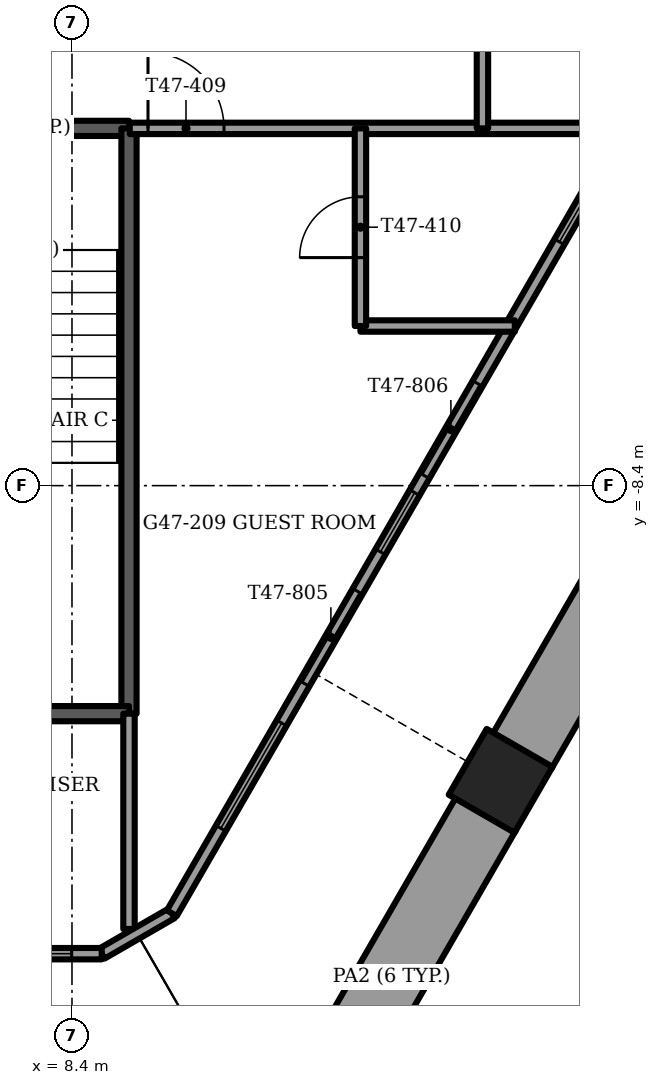
"""IFC4 building model, lengths in metres.
Left out: names, types, materials, properties, quantities, classifications, styles, units other than length and angle.
Written with IfcOpenShell. Run it as: python <this file> out.ifc"""

import sys

from ifc_helpers import new_model, si_unit, direction, frame, frame_2d, origin, origin_2d, place, context, subcontext, project, spatial, rectangle, extrude, element, fill, save


model = new_model("IFC4")
c1 = context("Model", 3, precision=1e-05, world=origin(), true_north=direction((0.0, 1.0)))
c2 = subcontext(c1, "Body", "Model", "MODEL_VIEW")
j1 = project(units=[si_unit("LENGTHUNIT", "METRE"), si_unit("PLANEANGLEUNIT", "RADIAN")], contexts=[c1])
p1 = place(None, origin())
s1 = spatial("IfcSite", under=j1, at=p1, CompositionType="ELEMENT")
p2 = place(p1, origin())
s2 = spatial("IfcBuilding", under=s1, at=p2, CompositionType="ELEMENT")
p3 = place(p2, frame((0.0, 0.0, 190.75)))
s3 = spatial("IfcBuildingStorey", under=s2, at=p3, CompositionType="ELEMENT", Elevation=190.75)
p4 = place(p3, frame((14.039, -12.283, -1.2), z_axis=(0.0, 0.0, 1.0), x_axis=(-0.5, -0.866025403784, 0.0)))
e1 = element("IfcColumn", 1, at=p4, inside=s3, PredefinedType="COLUMN", context=c2, shape_type="SweptSolid", body=[
    extrude(rectangle(XDim=1.0, YDim=1.0, at=origin_2d()), origin(), (0.0, 0.0, 1.0), 3.75),
])
p5 = place(p3, frame((11.366, -17.013, 0.0), z_axis=(0.0, 0.0, 1.0), x_axis=(0.499996428664, 0.866027465686, 0.0)))
e2 = element("IfcWall", 2, at=p5, inside=s3, PredefinedType="PARAPET", context=c2, shape_type="SweptSolid", body=[
    extrude(rectangle(XDim=4.962, YDim=0.9, at=frame_2d((2.481, 0.0))), origin(), (0.0, 0.0, 1.0), 1.1),
])
p6 = place(p3, frame((14.317, -11.901, 0.0), z_axis=(0.0, 0.0, 1.0), x_axis=(0.500013351051, 0.866017695414, 0.0)))
e3 = element("IfcWall", 3, at=p6, inside=s3, PredefinedType="PARAPET", context=c2, shape_type="SweptSolid", body=[
    extrude(rectangle(XDim=6.296, YDim=0.9, at=frame_2d((3.148, 0.0))), origin(), (0.0, 0.0, 1.0), 1.1),
])
p7 = place(p3, frame((-8.792, -14.558, 0.0), z_axis=(0.0, 0.0, 1.0), x_axis=(1.0, 0.0, 0.0)))
e4 = element("IfcWall", 4, at=p7, inside=s3, PredefinedType="SOLIDWALL", context=c2, shape_type="SweptSolid", body=[
    extrude(rectangle(XDim=17.583, YDim=0.15, at=frame_2d((8.792, 0.0))), origin(), (0.0, 0.0, 1.0), 3.45),
])
p8 = place(p7, frame((3.342, 0.0, 0.15)))
e5 = element("IfcOpeningElement", 5, at=p8, cuts=e4, PredefinedType="OPENING", context=c2, shape_type="SweptSolid", body=[
    extrude(rectangle(XDim=1.6, YDim=2.85, at=frame_2d((0.8, 1.425))), frame((0.0, 0.075, 0.0), z_axis=(0.0, -1.0, 0.0), x_axis=(1.0, 0.0, 0.0)), (0.0, 0.0, 1.0), 0.15),
])
p9 = place(p7, frame((4.991, 0.0, 0.0)))
e6 = element("IfcOpeningElement", 6, at=p9, cuts=e4, PredefinedType="OPENING", context=c2, shape_type="SweptSolid", body=[
    extrude(rectangle(XDim=1.4, YDim=2.4, at=frame_2d((0.7, 1.2))), frame((0.0, 0.075, 0.0), z_axis=(0.0, -1.0, 0.0), x_axis=(1.0, 0.0, 0.0)), (0.0, 0.0, 1.0), 0.15),
])
p10 = place(p7, frame((8.241, 0.0, 0.15)))
e7 = element("IfcOpeningElement", 7, at=p10, cuts=e4, PredefinedType="OPENING", context=c2, shape_type="SweptSolid", body=[
    extrude(rectangle(XDim=0.9, YDim=2.85, at=frame_2d((0.45, 1.425))), frame((0.0, 0.075, 0.0), z_axis=(0.0, -1.0, 0.0), x_axis=(1.0, 0.0, 0.0)), (0.0, 0.0, 1.0), 0.15),
])
p11 = place(p7, frame((11.191, 0.0, 0.15)))
e8 = element("IfcOpeningElement", 8, at=p11, cuts=e4, PredefinedType="OPENING", context=c2, shape_type="SweptSolid", body=[
    extrude(rectangle(XDim=0.9, YDim=2.85, at=frame_2d((0.45, 1.425))), frame((0.0, 0.075, 0.0), z_axis=(0.0, -1.0, 0.0), x_axis=(1.0, 0.0, 0.0)), (0.0, 0.0, 1.0), 0.15),
])
p12 = place(p7, frame((12.292, 0.0, 0.0)))
e9 = element("IfcOpeningElement", 9, at=p12, cuts=e4, PredefinedType="OPENING", context=c2, shape_type="SweptSolid", body=[
    extrude(rectangle(XDim=1.4, YDim=2.4, at=frame_2d((0.7, 1.2))), frame((0.0, 0.075, 0.0), z_axis=(0.0, -1.0, 0.0), x_axis=(1.0, 0.0, 0.0)), (0.0, 0.0, 1.0), 0.15),
])
p13 = place(p7, frame((0.396, 0.0, 0.15)))
e10 = element("IfcOpeningElement", 10, at=p13, cuts=e4, PredefinedType="OPENING", context=c2, shape_type="SweptSolid", body=[
    extrude(rectangle(XDim=1.6, YDim=2.73, at=frame_2d((0.8, 1.365))), frame((0.0, 0.075, 0.0), z_axis=(0.0, -1.0, 0.0), x_axis=(1.0, 0.0, 0.0)), (0.0, 0.0, 1.0), 0.15),
])
p14 = place(p7, frame((15.587, 0.0, 0.15)))
e11 = element("IfcOpeningElement", 11, at=p14, cuts=e4, PredefinedType="OPENING", context=c2, shape_type="SweptSolid", body=[
    extrude(rectangle(XDim=1.6, YDim=2.73, at=frame_2d((0.8, 1.365))), frame((0.0, 0.075, 0.0), z_axis=(0.0, -1.0, 0.0), x_axis=(1.0, 0.0, 0.0)), (0.0, 0.0, 1.0), 0.15),
])
p15 = place(p3, frame((9.714, -14.025, 0.0), z_axis=(0.0, 0.0, 1.0), x_axis=(0.500006098247, 0.866021882931, 0.0)))
e12 = element("IfcWall", 12, at=p15, inside=s3, PredefinedType="SOLIDWALL", context=c2, shape_type="SweptSolid", body=[
    extrude(rectangle(XDim=14.578, YDim=0.15, at=frame_2d((7.289, 0.0))), origin(), (0.0, 0.0, 1.0), 3.45),
])
p16 = place(p15, frame((1.289, 0.0, 0.15)))
e13 = element("IfcOpeningElement", 13, at=p16, cuts=e12, PredefinedType="OPENING", context=c2, shape_type="SweptSolid", body=[
    extrude(rectangle(XDim=1.6, YDim=2.85, at=frame_2d((0.8, 1.425))), frame((0.0, 0.075, 0.0), z_axis=(0.0, -1.0, 0.0), x_axis=(1.0, 0.0, 0.0)), (0.0, 0.0, 1.0), 0.15),
])
p17 = place(p15, frame((3.489, 0.0, 0.0)))
e14 = element("IfcOpeningElement", 14, at=p17, cuts=e12, PredefinedType="OPENING", context=c2, shape_type="SweptSolid", body=[
    extrude(rectangle(XDim=1.4, YDim=2.4, at=frame_2d((0.7, 1.2))), frame((0.0, 0.075, 0.0), z_axis=(0.0, -1.0, 0.0), x_axis=(1.0, 0.0, 0.0)), (0.0, 0.0, 1.0), 0.15),
])
p18 = place(p15, frame((5.489, 0.0, 0.15)))
e15 = element("IfcOpeningElement", 15, at=p18, cuts=e12, PredefinedType="OPENING", context=c2, shape_type="SweptSolid", body=[
    extrude(rectangle(XDim=0.9, YDim=2.85, at=frame_2d((0.45, 1.425))), frame((0.0, 0.075, 0.0), z_axis=(0.0, -1.0, 0.0), x_axis=(1.0, 0.0, 0.0)), (0.0, 0.0, 1.0), 0.15),
])
p19 = place(p15, frame((6.646, 0.0, 0.0)))
e16 = element("IfcOpeningElement", 16, at=p19, cuts=e12, PredefinedType="OPENING", context=c2, shape_type="SweptSolid", body=[
    extrude(rectangle(XDim=1.4, YDim=2.4, at=frame_2d((0.7, 1.2))), frame((0.0, 0.075, 0.0), z_axis=(0.0, -1.0, 0.0), x_axis=(1.0, 0.0, 0.0)), (0.0, 0.0, 1.0), 0.15),
])
p20 = place(p15, frame((12.298, 0.0, 0.15)))
e17 = element("IfcOpeningElement", 17, at=p20, cuts=e12, PredefinedType="OPENING", context=c2, shape_type="SweptSolid", body=[
    extrude(rectangle(XDim=0.9, YDim=2.85, at=frame_2d((0.45, 1.425))), frame((0.0, 0.075, 0.0), z_axis=(0.0, -1.0, 0.0), x_axis=(1.0, 0.0, 0.0)), (0.0, 0.0, 1.0), 0.15),
])
p21 = place(p15, frame((10.198, 0.0, 0.15)))
e18 = element("IfcOpeningElement", 18, at=p21, cuts=e12, PredefinedType="OPENING", context=c2, shape_type="SweptSolid", body=[
    extrude(rectangle(XDim=1.4, YDim=2.85, at=frame_2d((0.7, 1.425))), frame((0.0, 0.075, 0.0), z_axis=(0.0, -1.0, 0.0), x_axis=(1.0, 0.0, 0.0)), (0.0, 0.0, 1.0), 0.15),
])
p22 = place(p3, frame((8.792, -14.558, 0.0), z_axis=(0.0, 0.0, 1.0), x_axis=(0.866048165231, 0.499960573946, 0.0)))
e19 = element("IfcWall", 19, at=p22, inside=s3, PredefinedType="SOLIDWALL", context=c2, shape_type="SweptSolid", body=[
    extrude(rectangle(XDim=1.065, YDim=0.15, at=frame_2d((0.532, 0.0))), origin(), (0.0, 0.0, 1.0), 3.45),
])
p23 = place(p3, frame((5.8, -3.7, -0.3), z_axis=(0.0, 0.0, 1.0), x_axis=(1.0, 0.0, 0.0)))
e20 = element("IfcWall", 20, at=p23, inside=s3, PredefinedType="SOLIDWALL", context=c2, shape_type="SweptSolid", body=[
    extrude(rectangle(XDim=3.35, YDim=0.2, at=frame_2d((1.675, 0.0))), origin(), (0.0, 0.0, 1.0), 3.75),
])
p24 = place(p23, frame((1.125, 0.0, 0.0)))
e21 = element("IfcOpeningElement", 21, at=p24, cuts=e20, PredefinedType="OPENING", context=c2, shape_type="SweptSolid", body=[
    extrude(rectangle(XDim=1.1, YDim=2.1, at=frame_2d((0.55, 1.05))), frame((0.0, 0.1, 0.0), z_axis=(0.0, -1.0, 0.0), x_axis=(1.0, 0.0, 0.0)), (0.0, 0.0, 1.0), 0.2),
])
p25 = place(p3, frame((9.15, -3.7, -0.3), z_axis=(0.0, 0.0, 1.0), x_axis=(0.0, -1.0, 0.0)))
e22 = element("IfcWall", 22, at=p25, inside=s3, PredefinedType="SOLIDWALL", context=c2, shape_type="SweptSolid", body=[
    extrude(rectangle(XDim=7.7, YDim=0.2, at=frame_2d((3.85, 0.0))), origin(), (0.0, 0.0, 1.0), 3.75),
])
p26 = place(p3, frame((5.8, -11.4, -0.3), z_axis=(0.0, 0.0, 1.0), x_axis=(1.0, 0.0, 0.0)))
e23 = element("IfcWall", 23, at=p26, inside=s3, PredefinedType="SOLIDWALL", context=c2, shape_type="SweptSolid", body=[
    extrude(rectangle(XDim=3.35, YDim=0.2, at=frame_2d((1.675, 0.0))), origin(), (0.0, 0.0, 1.0), 3.75),
])
p27 = place(p3, frame((9.15, -11.4, 0.0), z_axis=(0.0, 0.0, 1.0), x_axis=(0.0, -1.0, 0.0)))
e24 = element("IfcWall", 24, at=p27, inside=s3, PredefinedType="PARTITIONING", context=c2, shape_type="SweptSolid", body=[
    extrude(rectangle(XDim=2.833, YDim=0.15, at=frame_2d((1.416, 0.0))), origin(), (0.0, 0.0, 1.0), 3.45),
])
p28 = place(p3, frame((12.195, -6.3, 0.0), z_axis=(0.0, 0.0, 1.0), x_axis=(1.0, 0.0, 0.0)))
e25 = element("IfcWall", 25, at=p28, inside=s3, PredefinedType="PARTITIONING", context=c2, shape_type="SweptSolid", body=[
    extrude(rectangle(XDim=2.031, YDim=0.15, at=frame_2d((1.016, 0.0))), origin(), (0.0, 0.0, 1.0), 3.45),
])
p29 = place(p3, frame((9.16, -3.7, 0.0), z_axis=(0.0, 0.0, 1.0), x_axis=(1.0, 0.0, 0.0)))
e26 = element("IfcWall", 26, at=p29, inside=s3, PredefinedType="PARTITIONING", context=c2, shape_type="SweptSolid", body=[
    extrude(rectangle(XDim=6.567, YDim=0.15, at=frame_2d((3.284, 0.0))), origin(), (0.0, 0.0, 1.0), 3.45),
])
p30 = place(p29, frame((0.24, 0.0, 0.0)))
e27 = element("IfcOpeningElement", 27, at=p30, cuts=e26, PredefinedType="OPENING", context=c2, shape_type="SweptSolid", body=[
    extrude(rectangle(XDim=1.0, YDim=2.1, at=frame_2d((0.5, 1.05))), frame((0.0, 0.075, 0.0), z_axis=(0.0, -1.0, 0.0), x_axis=(1.0, 0.0, 0.0)), (0.0, 0.0, 1.0), 0.15),
])
p31 = place(p3, frame((13.8, -3.7, 0.0), z_axis=(0.0, 0.0, 1.0), x_axis=(0.0, 1.0, 0.0)))
e28 = element("IfcWall", 28, at=p31, inside=s3, PredefinedType="PARTITIONING", context=c2, shape_type="SweptSolid", body=[
    extrude(rectangle(XDim=2.0, YDim=0.15, at=frame_2d((1.0, 0.0))), origin(), (0.0, 0.0, 1.0), 3.45),
])
p32 = place(p3, frame((12.195, -6.3, 0.0), z_axis=(0.0, 0.0, 1.0), x_axis=(0.0, 1.0, 0.0)))
e29 = element("IfcWall", 29, at=p32, inside=s3, PredefinedType="PARTITIONING", context=c2, shape_type="SweptSolid", body=[
    extrude(rectangle(XDim=2.6, YDim=0.15, at=frame_2d((1.3, 0.0))), origin(), (0.0, 0.0, 1.0), 3.45),
])
p33 = place(p32, frame((0.9, 0.0, 0.0)))
e30 = element("IfcOpeningElement", 30, at=p33, cuts=e29, PredefinedType="OPENING", context=c2, shape_type="SweptSolid", body=[
    extrude(rectangle(XDim=0.8, YDim=2.1, at=frame_2d((0.4, 1.05))), frame((0.0, 0.075, 0.0), z_axis=(0.0, -1.0, 0.0), x_axis=(1.0, 0.0, 0.0)), (0.0, 0.0, 1.0), 0.15),
])
p34 = place(p14, origin())
e31 = element("IfcWindow", 31, at=p34, inside=s3, PartitioningType="SINGLE_PANEL", PredefinedType="WINDOW", context=c2, shape_type="SweptSolid", body=[
    extrude(rectangle(XDim=1.6, YDim=2.73, at=frame_2d((0.8, 1.365))), frame((0.0, 0.03, 0.0), z_axis=(0.0, -1.0, 0.0), x_axis=(1.0, 0.0, 0.0)), (0.0, 0.0, 1.0), 0.06),
])
fill(e11, e31)
p35 = place(p16, origin())
e32 = element("IfcWindow", 32, at=p35, inside=s3, PartitioningType="SINGLE_PANEL", PredefinedType="WINDOW", context=c2, shape_type="SweptSolid", body=[
    extrude(rectangle(XDim=1.6, YDim=2.85, at=frame_2d((0.8, 1.425))), frame((0.0, 0.03, 0.0), z_axis=(0.0, -1.0, 0.0), x_axis=(1.0, 0.0, 0.0)), (0.0, 0.0, 1.0), 0.06),
])
fill(e13, e32)
p36 = place(p17, origin())
e33 = element("IfcDoor", 33, at=p36, inside=s3, OperationType="SLIDING_TO_LEFT", PredefinedType="DOOR", context=c2, shape_type="SweptSolid", body=[
    extrude(rectangle(XDim=1.4, YDim=2.4, at=frame_2d((0.7, 1.2))), frame((0.0, 0.025, 0.0), z_axis=(0.0, -1.0, 0.0), x_axis=(1.0, 0.0, 0.0)), (0.0, 0.0, 1.0), 0.05),
])
fill(e14, e33)
p37 = place(p18, origin())
e34 = element("IfcWindow", 34, at=p37, inside=s3, PartitioningType="SINGLE_PANEL", PredefinedType="WINDOW", context=c2, shape_type="SweptSolid", body=[
    extrude(rectangle(XDim=0.9, YDim=2.85, at=frame_2d((0.45, 1.425))), frame((0.0, 0.03, 0.0), z_axis=(0.0, -1.0, 0.0), x_axis=(1.0, 0.0, 0.0)), (0.0, 0.0, 1.0), 0.06),
])
fill(e15, e34)
p38 = place(p19, origin())
e35 = element("IfcDoor", 35, at=p38, inside=s3, OperationType="SLIDING_TO_RIGHT", PredefinedType="DOOR", context=c2, shape_type="SweptSolid", body=[
    extrude(rectangle(XDim=1.4, YDim=2.4, at=frame_2d((0.7, 1.2))), frame((0.0, 0.025, 0.0), z_axis=(0.0, -1.0, 0.0), x_axis=(1.0, 0.0, 0.0)), (0.0, 0.0, 1.0), 0.05),
])
fill(e16, e35)
p39 = place(p21, origin())
e36 = element("IfcWindow", 36, at=p39, inside=s3, PartitioningType="SINGLE_PANEL", PredefinedType="WINDOW", context=c2, shape_type="SweptSolid", body=[
    extrude(rectangle(XDim=1.4, YDim=2.85, at=frame_2d((0.7, 1.425))), frame((0.0, 0.03, 0.0), z_axis=(0.0, -1.0, 0.0), x_axis=(1.0, 0.0, 0.0)), (0.0, 0.0, 1.0), 0.06),
])
fill(e18, e36)
p40 = place(p30, origin())
e37 = element("IfcDoor", 37, at=p40, inside=s3, OperationType="SINGLE_SWING_LEFT", PredefinedType="DOOR", context=c2, shape_type="SweptSolid", body=[
    extrude(rectangle(XDim=1.0, YDim=2.1, at=frame_2d((0.5, 1.05))), frame((0.0, 0.025, 0.0), z_axis=(0.0, -1.0, 0.0), x_axis=(1.0, 0.0, 0.0)), (0.0, 0.0, 1.0), 0.05),
])
fill(e27, e37)
p41 = place(p33, origin())
e38 = element("IfcDoor", 38, at=p41, inside=s3, OperationType="SINGLE_SWING_RIGHT", PredefinedType="DOOR", context=c2, shape_type="SweptSolid", body=[
    extrude(rectangle(XDim=0.8, YDim=2.1, at=frame_2d((0.4, 1.05))), frame((0.0, 0.025, 0.0), z_axis=(0.0, -1.0, 0.0), x_axis=(1.0, 0.0, 0.0)), (0.0, 0.0, 1.0), 0.05),
])
fill(e30, e38)
save(model, sys.argv[1])
